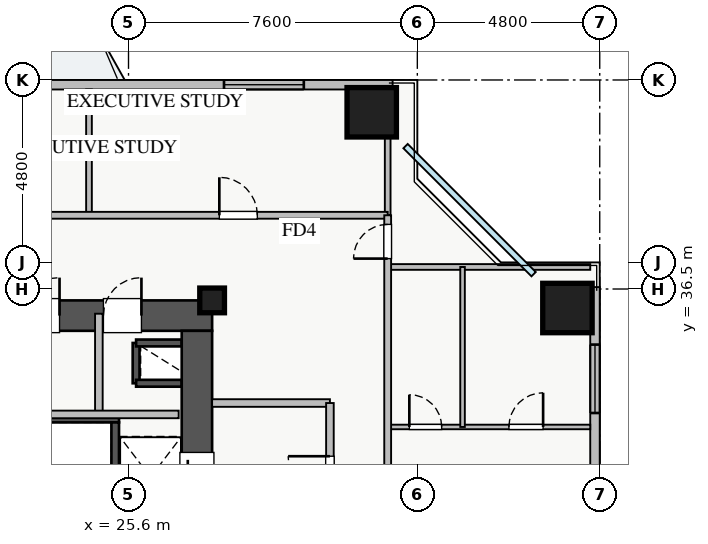
"""IFC4 building model, lengths in metres.
Left out: names, types, materials, properties, quantities, classifications, styles, units other than length and angle.
Written with IfcOpenShell. Run it as: python <this file> out.ifc"""

import sys

from ifc_helpers import new_model, si_unit, direction, frame, frame_2d, origin, origin_2d, place, context, subcontext, project, spatial, rectangle, extrude, source, transform, mapped, element, fill, save


model = new_model("IFC4")
c1 = context("Model", 3, precision=1e-05, world=origin(), true_north=direction((0.0, 1.0)))
c2 = subcontext(c1, "Body", "Model", "MODEL_VIEW")
j1 = project(units=[si_unit("LENGTHUNIT", "METRE"), si_unit("PLANEANGLEUNIT", "RADIAN")], contexts=[c1])
p1 = place(None, origin())
s1 = spatial("IfcSite", under=j1, at=p1, CompositionType="ELEMENT")
p2 = place(p1, origin())
s2 = spatial("IfcBuilding", under=s1, at=p2, CompositionType="ELEMENT")
p3 = place(p2, frame((0.0, 0.0, 36.0)))
s3 = spatial("IfcBuildingStorey", under=s2, at=p3, CompositionType="ELEMENT", Elevation=36.0)
p4 = place(p3, frame((25.8, 34.02, 0.0), z_axis=(0.0, 0.0, 1.0), x_axis=(0.0, 1.0, 0.0)))
e1 = element("IfcWall", 1, at=p4, inside=s3, PredefinedType="SHEAR", context=c2, shape_type="SweptSolid", body=[
    extrude(rectangle(XDim=1.06, YDim=0.18, at=frame_2d((0.53, 0.0))), origin(), (0.0, 0.0, 1.0), 3.07),
])
for number, where, z_axis, x_axis in (
    (2, (25.8, 35.08, 0.0), (0.0, 0.0, 1.0), (1.0, 0.0, 0.0)),
    (3, (25.8, 34.02, 0.0), (0.0, 0.0, 1.0), (1.0, 0.0, 0.0)),
):
    element("IfcWall", number, at=place(p3, frame(where, z_axis=z_axis, x_axis=x_axis)), inside=s3, PredefinedType="SHEAR", context=c2, shape_type="SweptSolid", body=[
        extrude(rectangle(XDim=1.2, YDim=0.18, at=frame_2d((0.6, 0.0))), origin(), (0.0, 0.0, 1.0), 3.07),
    ])
p5 = place(p3, frame((18.2, 33.09, 0.0), z_axis=(0.0, 0.0, 1.0), x_axis=(1.0, 0.0, 0.0)))
e4 = element("IfcWall", 4, at=p5, inside=s3, PredefinedType="SHEAR", context=c2, shape_type="SweptSolid", body=[
    extrude(rectangle(XDim=7.15, YDim=0.2, at=frame_2d((3.575, 0.0))), origin(), (0.0, 0.0, 1.0), 3.25),
])
p6 = place(p5, frame((0.35, 0.0, 0.0)))
e5 = element("IfcOpeningElement", 5, at=p6, cuts=e4, PredefinedType="OPENING", context=c2, shape_type="SweptSolid", body=[
    extrude(rectangle(XDim=1.1, YDim=2.05, at=frame_2d((0.55, 1.025))), frame((0.0, 0.11, 0.0), z_axis=(0.0, -1.0, 0.0), x_axis=(1.0, 0.0, 0.0)), (0.0, 0.0, 1.0), 0.22),
])
p7 = place(p3, frame((25.25, 30.05, 0.0), z_axis=(0.0, 0.0, 1.0), x_axis=(0.0, 1.0, 0.0)))
e6 = element("IfcWall", 6, at=p7, inside=s3, PredefinedType="SHEAR", context=c2, shape_type="SweptSolid", body=[
    extrude(rectangle(XDim=2.94, YDim=0.2, at=frame_2d((1.47, 0.0))), origin(), (0.0, 0.0, 1.0), 3.25),
])
p8 = place(p3, frame((10.2, 35.8, 0.0), z_axis=(0.0, 0.0, 1.0), x_axis=(1.0, 0.0, 0.0)))
e7 = element("IfcWall", 7, at=p8, inside=s3, PredefinedType="SHEAR", context=c2, shape_type="SweptSolid", body=[
    extrude(rectangle(XDim=17.6, YDim=0.8, at=frame_2d((8.8, 0.0))), origin(), (0.0, 0.0, 1.0), 3.25),
])
p9 = place(p8, frame((1.15, 0.0, 0.0)))
e8 = element("IfcOpeningElement", 8, at=p9, cuts=e7, PredefinedType="OPENING", context=c2, shape_type="SweptSolid", body=[
    extrude(rectangle(XDim=1.1, YDim=2.05, at=frame_2d((0.55, 1.025))), frame((0.0, 0.41, 0.0), z_axis=(0.0, -1.0, 0.0), x_axis=(1.0, 0.0, 0.0)), (0.0, 0.0, 1.0), 0.82),
])
p10 = place(p8, frame((8.3, 0.0, 0.0)))
e9 = element("IfcOpeningElement", 9, at=p10, cuts=e7, PredefinedType="OPENING", context=c2, shape_type="SweptSolid", body=[
    extrude(rectangle(XDim=1.1, YDim=2.05, at=frame_2d((0.55, 1.025))), frame((0.0, 0.41, 0.0), z_axis=(0.0, -1.0, 0.0), x_axis=(1.0, 0.0, 0.0)), (0.0, 0.0, 1.0), 0.82),
])
p11 = place(p8, frame((10.05, 0.0, 0.0)))
e10 = element("IfcOpeningElement", 10, at=p11, cuts=e7, PredefinedType="OPENING", context=c2, shape_type="SweptSolid", body=[
    extrude(rectangle(XDim=1.1, YDim=2.05, at=frame_2d((0.55, 1.025))), frame((0.0, 0.41, 0.0), z_axis=(0.0, -1.0, 0.0), x_axis=(1.0, 0.0, 0.0)), (0.0, 0.0, 1.0), 0.82),
])
p12 = place(p8, frame((14.74, 0.0, 0.0)))
e11 = element("IfcOpeningElement", 11, at=p12, cuts=e7, PredefinedType="OPENING", context=c2, shape_type="SweptSolid", body=[
    extrude(rectangle(XDim=1.0, YDim=2.05, at=frame_2d((0.5, 1.025))), frame((0.0, 0.41, 0.0), z_axis=(0.0, -1.0, 0.0), x_axis=(1.0, 0.0, 0.0)), (0.0, 0.0, 1.0), 0.82),
])
p13 = place(p8, frame((12.585, 0.0, 0.0)))
e12 = element("IfcOpeningElement", 12, at=p13, cuts=e7, PredefinedType="OPENING", context=c2, shape_type="SweptSolid", body=[
    extrude(rectangle(XDim=1.0, YDim=2.05, at=frame_2d((0.5, 1.025))), frame((0.0, 0.41, 0.0), z_axis=(0.0, -1.0, 0.0), x_axis=(1.0, 0.0, 0.0)), (0.0, 0.0, 1.0), 0.82),
])
p14 = place(p3, frame((27.4, 29.8, 0.0), z_axis=(0.0, 0.0, 1.0), x_axis=(0.0, 1.0, 0.0)))
e13 = element("IfcWall", 13, at=p14, inside=s3, PredefinedType="SHEAR", context=c2, shape_type="SweptSolid", body=[
    extrude(rectangle(XDim=5.6, YDim=0.8, at=frame_2d((2.8, 0.0))), origin(), (0.0, 0.0, 1.0), 3.25),
])
p15 = place(p14, frame((1.1, 0.0, 0.0)))
e14 = element("IfcOpeningElement", 14, at=p15, cuts=e13, PredefinedType="OPENING", context=c2, shape_type="SweptSolid", body=[
    extrude(rectangle(XDim=1.3, YDim=2.05, at=frame_2d((0.65, 1.025))), frame((0.0, 0.41, 0.0), z_axis=(0.0, -1.0, 0.0), x_axis=(1.0, 0.0, 0.0)), (0.0, 0.0, 1.0), 0.82),
])
m1 = source(origin(), c2, "Body", "SweptSolid", [
    extrude(rectangle(XDim=0.65, YDim=0.65, at=origin_2d()), origin(), (0.0, 0.0, 1.0), 3.25),
])
p16 = place(p3, frame((27.8, 36.2, 0.0), z_axis=(0.0, 0.0, 1.0), x_axis=(1.0, 0.0, 0.0)))
e15 = element("IfcColumn", 15, at=p16, inside=s3, PredefinedType="PILASTER", context=c2, shape_type="MappedRepresentation", body=[
    mapped(m1, transform((0.0, 0.0, 0.0), x_axis=(1.0, 0.0, 0.0), y_axis=(0.0, 1.0, 0.0), z_axis=(0.0, 0.0, 1.0), scale=1.0)),
])
m2 = source(origin(), c2, "Body", "SweptSolid", [
    extrude(rectangle(XDim=1.3, YDim=1.3, at=origin_2d()), origin(), (0.0, 0.0, 1.0), 3.25),
])
for number, where, z_axis, x_axis in (
    (16, (37.15, 36.0, 0.0), (0.0, 0.0, 1.0), (1.0, 0.0, 0.0)),
    (17, (32.0, 41.15, 0.0), (0.0, 0.0, 1.0), (1.0, 0.0, 0.0)),
):
    element("IfcColumn", number, at=place(p3, frame(where, z_axis=z_axis, x_axis=x_axis)), inside=s3, PredefinedType="COLUMN", context=c2, shape_type="MappedRepresentation", body=[
        mapped(m2, transform((0.0, 0.0, 0.0), x_axis=(1.0, 0.0, 0.0), y_axis=(0.0, 1.0, 0.0), z_axis=(0.0, 0.0, 1.0), scale=1.0)),
    ])
p17 = place(p3, frame((5.45, 41.875, 0.0), z_axis=(0.0, 0.0, 1.0), x_axis=(1.0, 0.0, 0.0)))
e18 = element("IfcWall", 18, at=p17, inside=s3, PredefinedType="STANDARD", context=c2, shape_type="SweptSolid", body=[
    extrude(rectangle(XDim=27.1, YDim=0.25, at=frame_2d((13.55, 0.0))), origin(), (0.0, 0.0, 1.0), 2.61),
])
p18 = place(p17, frame((14.4, 0.0, 0.0)))
e19 = element("IfcOpeningElement", 19, at=p18, cuts=e18, PredefinedType="OPENING", context=c2, shape_type="SweptSolid", body=[
    extrude(rectangle(XDim=1.2, YDim=2.1, at=frame_2d((0.6, 1.05))), frame((0.0, 0.135, 0.0), z_axis=(0.0, -1.0, 0.0), x_axis=(1.0, 0.0, 0.0)), (0.0, 0.0, 1.0), 0.27),
])
p19 = place(p17, frame((1.365, 0.0, 0.9)))
e20 = element("IfcOpeningElement", 20, at=p19, cuts=e18, PredefinedType="OPENING", context=c2, shape_type="SweptSolid", body=[
    extrude(rectangle(XDim=1.8, YDim=1.5, at=frame_2d((0.9, 0.75))), frame((0.0, 0.135, 0.0), z_axis=(0.0, -1.0, 0.0), x_axis=(1.0, 0.0, 0.0)), (0.0, 0.0, 1.0), 0.27),
])
p20 = place(p17, frame((9.263, 0.0, 0.9)))
e21 = element("IfcOpeningElement", 21, at=p20, cuts=e18, PredefinedType="OPENING", context=c2, shape_type="SweptSolid", body=[
    extrude(rectangle(XDim=1.8, YDim=1.45, at=frame_2d((0.9, 0.725))), frame((0.0, 0.135, 0.0), z_axis=(0.0, -1.0, 0.0), x_axis=(1.0, 0.0, 0.0)), (0.0, 0.0, 1.0), 0.27),
])
p21 = place(p17, frame((16.188, 0.0, 0.9)))
e22 = element("IfcOpeningElement", 22, at=p21, cuts=e18, PredefinedType="OPENING", context=c2, shape_type="SweptSolid", body=[
    extrude(rectangle(XDim=1.5, YDim=1.45, at=frame_2d((0.75, 0.725))), frame((0.0, 0.135, 0.0), z_axis=(0.0, -1.0, 0.0), x_axis=(1.0, 0.0, 0.0)), (0.0, 0.0, 1.0), 0.27),
])
p22 = place(p17, frame((22.663, 0.0, 0.9)))
e23 = element("IfcOpeningElement", 23, at=p22, cuts=e18, PredefinedType="OPENING", context=c2, shape_type="SweptSolid", body=[
    extrude(rectangle(XDim=2.1, YDim=1.48, at=frame_2d((1.05, 0.74))), frame((0.0, 0.135, 0.0), z_axis=(0.0, -1.0, 0.0), x_axis=(1.0, 0.0, 0.0)), (0.0, 0.0, 1.0), 0.27),
])
p23 = place(p17, frame((5.149, 0.0, 0.9)))
e24 = element("IfcOpeningElement", 24, at=p23, cuts=e18, PredefinedType="OPENING", context=c2, shape_type="SweptSolid", body=[
    extrude(rectangle(XDim=2.4, YDim=1.5, at=frame_2d((1.2, 0.75))), frame((0.0, 0.135, 0.0), z_axis=(0.0, -1.0, 0.0), x_axis=(1.0, 0.0, 0.0)), (0.0, 0.0, 1.0), 0.27),
])
p24 = place(p3, frame((37.875, 9.45, 0.0), z_axis=(0.0, 0.0, 1.0), x_axis=(0.0, 1.0, 0.0)))
e25 = element("IfcWall", 25, at=p24, inside=s3, PredefinedType="STANDARD", context=c2, shape_type="SweptSolid", body=[
    extrude(rectangle(XDim=27.1, YDim=0.25, at=frame_2d((13.55, 0.0))), origin(), (0.0, 0.0, 1.0), 2.61),
])
p25 = place(p24, frame((14.4, 0.0, 0.0)))
e26 = element("IfcOpeningElement", 26, at=p25, cuts=e25, PredefinedType="OPENING", context=c2, shape_type="SweptSolid", body=[
    extrude(rectangle(XDim=1.2, YDim=2.1, at=frame_2d((0.6, 1.05))), frame((0.0, 0.135, 0.0), z_axis=(0.0, -1.0, 0.0), x_axis=(1.0, 0.0, 0.0)), (0.0, 0.0, 1.0), 0.27),
])
p26 = place(p24, frame((1.552, 0.0, 0.9)))
e27 = element("IfcOpeningElement", 27, at=p26, cuts=e25, PredefinedType="OPENING", context=c2, shape_type="SweptSolid", body=[
    extrude(rectangle(XDim=2.4, YDim=1.5, at=frame_2d((1.2, 0.75))), frame((0.0, 0.135, 0.0), z_axis=(0.0, -1.0, 0.0), x_axis=(1.0, 0.0, 0.0)), (0.0, 0.0, 1.0), 0.27),
])
p27 = place(p24, frame((23.788, 0.0, 0.9)))
e28 = element("IfcOpeningElement", 28, at=p27, cuts=e25, PredefinedType="OPENING", context=c2, shape_type="SweptSolid", body=[
    extrude(rectangle(XDim=1.8, YDim=1.5, at=frame_2d((0.9, 0.75))), frame((0.0, 0.135, 0.0), z_axis=(0.0, -1.0, 0.0), x_axis=(1.0, 0.0, 0.0)), (0.0, 0.0, 1.0), 0.27),
])
p28 = place(p24, frame((19.758, 0.0, 0.9)))
e29 = element("IfcOpeningElement", 29, at=p28, cuts=e25, PredefinedType="OPENING", context=c2, shape_type="SweptSolid", body=[
    extrude(rectangle(XDim=2.4, YDim=1.5, at=frame_2d((1.2, 0.75))), frame((0.0, 0.135, 0.0), z_axis=(0.0, -1.0, 0.0), x_axis=(1.0, 0.0, 0.0)), (0.0, 0.0, 1.0), 0.27),
])
p29 = place(p24, frame((8.755, 0.0, 0.9)))
e30 = element("IfcOpeningElement", 30, at=p29, cuts=e25, PredefinedType="OPENING", context=c2, shape_type="SweptSolid", body=[
    extrude(rectangle(XDim=0.9, YDim=1.2, at=frame_2d((0.45, 0.6))), frame((0.0, 0.135, 0.0), z_axis=(0.0, -1.0, 0.0), x_axis=(1.0, 0.0, 0.0)), (0.0, 0.0, 1.0), 0.27),
])
p30 = place(p3, frame((27.8, 33.5, 0.0), z_axis=(0.0, 0.0, 1.0), x_axis=(1.0, 0.0, 0.0)))
e31 = element("IfcWall", 31, at=p30, inside=s3, PredefinedType="PARTITIONING", context=c2, shape_type="SweptSolid", body=[
    extrude(rectangle(XDim=3.1, YDim=0.2, at=frame_2d((1.55, 0.0))), origin(), (0.0, 0.0, 1.0), 3.07),
])
p31 = place(p3, frame((30.9, 29.6, 0.0), z_axis=(0.0, 0.0, 1.0), x_axis=(0.0, 1.0, 0.0)))
e32 = element("IfcWall", 32, at=p31, inside=s3, PredefinedType="PARTITIONING", context=c2, shape_type="SweptSolid", body=[
    extrude(rectangle(XDim=3.9, YDim=0.2, at=frame_2d((1.95, 0.0))), origin(), (0.0, 0.0, 1.0), 3.07),
])
p32 = place(p31, frame((1.4, 0.0, 0.0)))
e33 = element("IfcOpeningElement", 33, at=p32, cuts=e32, PredefinedType="OPENING", context=c2, shape_type="SweptSolid", body=[
    extrude(rectangle(XDim=1.1, YDim=2.05, at=frame_2d((0.55, 1.025))), frame((0.0, 0.11, 0.0), z_axis=(0.0, -1.0, 0.0), x_axis=(1.0, 0.0, 0.0)), (0.0, 0.0, 1.0), 0.22),
])
p33 = place(p3, frame((24.82, 33.2, 0.0), z_axis=(0.0, 0.0, 1.0), x_axis=(0.0, 1.0, 0.0)))
e34 = element("IfcWall", 34, at=p33, inside=s3, PredefinedType="PARTITIONING", context=c2, shape_type="SweptSolid", body=[
    extrude(rectangle(XDim=2.65, YDim=0.2, at=frame_2d((1.325, 0.0))), origin(), (0.0, 0.0, 1.0), 3.07),
])
p34 = place(p3, frame((21.75, 33.2, 0.0), z_axis=(0.0, 0.0, 1.0), x_axis=(1.0, 0.0, 0.0)))
e35 = element("IfcWall", 35, at=p34, inside=s3, PredefinedType="PARTITIONING", context=c2, shape_type="SweptSolid", body=[
    extrude(rectangle(XDim=5.17, YDim=0.2, at=frame_2d((2.585, 0.0))), origin(), (0.0, 0.0, 1.0), 3.07),
])
for number, where, z_axis, x_axis in (
    (36, (24.56, 38.44, 0.0), (0.0, 0.0, 1.0), (0.0, 1.0, 0.0)),
    (37, (32.42, 38.44, 0.0), (0.0, 0.0, 1.0), (0.0, 1.0, 0.0)),
):
    element("IfcWall", number, at=place(p3, frame(where, z_axis=z_axis, x_axis=x_axis)), inside=s3, PredefinedType="PARTITIONING", context=c2, shape_type="SweptSolid", body=[
        extrude(rectangle(XDim=3.31, YDim=0.15, at=frame_2d((1.655, 0.0))), origin(), (0.0, 0.0, 1.0), 3.07),
    ])
p35 = place(p3, frame((8.85, 38.44, 0.0), z_axis=(0.0, 0.0, 1.0), x_axis=(1.0, 0.0, 0.0)))
e38 = element("IfcWall", 38, at=p35, inside=s3, PredefinedType="PARTITIONING", context=c2, shape_type="SweptSolid", body=[
    extrude(rectangle(XDim=23.57, YDim=0.18, at=frame_2d((11.785, 0.0))), origin(), (0.0, 0.0, 1.0), 3.07),
])
p36 = place(p35, frame((3.77, 0.0, 0.0)))
e39 = element("IfcOpeningElement", 39, at=p36, cuts=e38, PredefinedType="OPENING", context=c2, shape_type="SweptSolid", body=[
    extrude(rectangle(XDim=1.0, YDim=2.05, at=frame_2d((0.5, 1.025))), frame((0.0, 0.1, 0.0), z_axis=(0.0, -1.0, 0.0), x_axis=(1.0, 0.0, 0.0)), (0.0, 0.0, 1.0), 0.2),
])
p37 = place(p35, frame((11.625, 0.0, 0.0)))
e40 = element("IfcOpeningElement", 40, at=p37, cuts=e38, PredefinedType="OPENING", context=c2, shape_type="SweptSolid", body=[
    extrude(rectangle(XDim=1.0, YDim=2.05, at=frame_2d((0.5, 1.025))), frame((0.0, 0.1, 0.0), z_axis=(0.0, -1.0, 0.0), x_axis=(1.0, 0.0, 0.0)), (0.0, 0.0, 1.0), 0.2),
])
p38 = place(p35, frame((19.14, 0.0, 0.0)))
e41 = element("IfcOpeningElement", 41, at=p38, cuts=e38, PredefinedType="OPENING", context=c2, shape_type="SweptSolid", body=[
    extrude(rectangle(XDim=1.0, YDim=2.05, at=frame_2d((0.5, 1.025))), frame((0.0, 0.1, 0.0), z_axis=(0.0, -1.0, 0.0), x_axis=(1.0, 0.0, 0.0)), (0.0, 0.0, 1.0), 0.2),
])
p39 = place(p3, frame((32.42, 37.08, 0.0), z_axis=(0.0, 0.0, 1.0), x_axis=(1.0, 0.0, 0.0)))
e42 = element("IfcWall", 42, at=p39, inside=s3, PredefinedType="PARTITIONING", context=c2, shape_type="SweptSolid", body=[
    extrude(rectangle(XDim=5.33, YDim=0.15, at=frame_2d((2.665, 0.0))), origin(), (0.0, 0.0, 1.0), 3.07),
])
p40 = place(p3, frame((32.42, 32.87, 0.0), z_axis=(0.0, 0.0, 1.0), x_axis=(1.0, 0.0, 0.0)))
e43 = element("IfcWall", 43, at=p40, inside=s3, PredefinedType="PLUMBINGWALL", context=c2, shape_type="SweptSolid", body=[
    extrude(rectangle(XDim=5.33, YDim=0.12, at=frame_2d((2.665, 0.0))), origin(), (0.0, 0.0, 1.0), 3.07),
])
p41 = place(p40, frame((0.57, 0.0, 0.0)))
e44 = element("IfcOpeningElement", 44, at=p41, cuts=e43, PredefinedType="OPENING", context=c2, shape_type="SweptSolid", body=[
    extrude(rectangle(XDim=0.85, YDim=2.05, at=frame_2d((0.425, 1.025))), frame((0.0, 0.07, 0.0), z_axis=(0.0, -1.0, 0.0), x_axis=(1.0, 0.0, 0.0)), (0.0, 0.0, 1.0), 0.14),
])
p42 = place(p40, frame((3.19, 0.0, 0.0)))
e45 = element("IfcOpeningElement", 45, at=p42, cuts=e43, PredefinedType="OPENING", context=c2, shape_type="SweptSolid", body=[
    extrude(rectangle(XDim=0.9, YDim=2.05, at=frame_2d((0.45, 1.025))), frame((0.0, 0.07, 0.0), z_axis=(0.0, -1.0, 0.0), x_axis=(1.0, 0.0, 0.0)), (0.0, 0.0, 1.0), 0.14),
])
p43 = place(p3, frame((34.39, 32.87, 0.0), z_axis=(0.0, 0.0, 1.0), x_axis=(0.0, 1.0, 0.0)))
e46 = element("IfcWall", 46, at=p43, inside=s3, PredefinedType="PLUMBINGWALL", context=c2, shape_type="SweptSolid", body=[
    extrude(rectangle(XDim=4.21, YDim=0.12, at=frame_2d((2.105, 0.0))), origin(), (0.0, 0.0, 1.0), 3.07),
])
p44 = place(p3, frame((32.42, 7.21, 0.0), z_axis=(0.0, 0.0, 1.0), x_axis=(0.0, 1.0, 0.0)))
e47 = element("IfcWall", 47, at=p44, inside=s3, PredefinedType="PARTITIONING", context=c2, shape_type="SweptSolid", body=[
    extrude(rectangle(XDim=31.23, YDim=0.18, at=frame_2d((15.615, 0.0))), origin(), (0.0, 0.0, 1.0), 2.815),
])
p45 = place(p44, frame((30.09, 0.0, 0.0)))
e48 = element("IfcOpeningElement", 48, at=p45, cuts=e47, PredefinedType="OPENING", context=c2, shape_type="SweptSolid", body=[
    extrude(rectangle(XDim=0.9, YDim=2.05, at=frame_2d((0.45, 1.025))), frame((0.0, 0.1, 0.0), z_axis=(0.0, -1.0, 0.0), x_axis=(1.0, 0.0, 0.0)), (0.0, 0.0, 1.0), 0.2),
])
p46 = place(p44, frame((0.415, 0.0, 0.0)))
e49 = element("IfcOpeningElement", 49, at=p46, cuts=e47, PredefinedType="OPENING", context=c2, shape_type="SweptSolid", body=[
    extrude(rectangle(XDim=0.9, YDim=2.05, at=frame_2d((0.45, 1.025))), frame((0.0, 0.1, 0.0), z_axis=(0.0, -1.0, 0.0), x_axis=(1.0, 0.0, 0.0)), (0.0, 0.0, 1.0), 0.2),
])
p47 = place(p44, frame((3.465, 0.0, 0.0)))
e50 = element("IfcOpeningElement", 50, at=p47, cuts=e47, PredefinedType="OPENING", context=c2, shape_type="SweptSolid", body=[
    extrude(rectangle(XDim=1.0, YDim=2.05, at=frame_2d((0.5, 1.025))), frame((0.0, 0.1, 0.0), z_axis=(0.0, -1.0, 0.0), x_axis=(1.0, 0.0, 0.0)), (0.0, 0.0, 1.0), 0.2),
])
p48 = place(p44, frame((12.635, 0.0, 0.0)))
e51 = element("IfcOpeningElement", 51, at=p48, cuts=e47, PredefinedType="OPENING", context=c2, shape_type="SweptSolid", body=[
    extrude(rectangle(XDim=1.0, YDim=2.05, at=frame_2d((0.5, 1.025))), frame((0.0, 0.1, 0.0), z_axis=(0.0, -1.0, 0.0), x_axis=(1.0, 0.0, 0.0)), (0.0, 0.0, 1.0), 0.2),
])
p49 = place(p44, frame((22.5, 0.0, 0.0)))
e52 = element("IfcOpeningElement", 52, at=p49, cuts=e47, PredefinedType="OPENING", context=c2, shape_type="SweptSolid", body=[
    extrude(rectangle(XDim=1.0, YDim=2.05, at=frame_2d((0.5, 1.025))), frame((0.0, 0.1, 0.0), z_axis=(0.0, -1.0, 0.0), x_axis=(1.0, 0.0, 0.0)), (0.0, 0.0, 1.0), 0.2),
])
m3 = source(origin(), c2, "Body", "SweptSolid", [
    extrude(rectangle(XDim=2.1, YDim=1.48, at=frame_2d((1.05, 0.74))), frame((0.0, 0.03, 0.0), z_axis=(0.0, -1.0, 0.0), x_axis=(1.0, 0.0, 0.0)), (0.0, 0.0, 1.0), 0.06),
])
p50 = place(p22, origin())
e53 = element("IfcWindow", 53, at=p50, inside=s3, PartitioningType="TRIPLE_PANEL_VERTICAL", PredefinedType="WINDOW", context=c2, shape_type="MappedRepresentation", body=[
    mapped(m3, transform((0.0, 0.0, 0.0), x_axis=(1.0, 0.0, 0.0), y_axis=(0.0, 1.0, 0.0), z_axis=(0.0, 0.0, 1.0), scale=1.0)),
])
fill(e23, e53)
m4 = source(origin(), c2, "Body", "SweptSolid", [
    extrude(rectangle(XDim=1.8, YDim=1.5, at=frame_2d((0.9, 0.75))), frame((0.0, 0.03, 0.0), z_axis=(0.0, -1.0, 0.0), x_axis=(1.0, 0.0, 0.0)), (0.0, 0.0, 1.0), 0.06),
])
p51 = place(p27, origin())
e54 = element("IfcWindow", 54, at=p51, inside=s3, PartitioningType="TRIPLE_PANEL_VERTICAL", PredefinedType="WINDOW", context=c2, shape_type="MappedRepresentation", body=[
    mapped(m4, transform((0.0, 0.0, 0.0), x_axis=(1.0, 0.0, 0.0), y_axis=(0.0, 1.0, 0.0), z_axis=(0.0, 0.0, 1.0), scale=1.0)),
])
fill(e28, e54)
m5 = source(origin(), c2, "Body", "SweptSolid", [
    extrude(rectangle(XDim=1.3, YDim=2.05, at=frame_2d((0.65, 1.025))), frame((0.0, 0.025, 0.0), z_axis=(0.0, -1.0, 0.0), x_axis=(1.0, 0.0, 0.0)), (0.0, 0.0, 1.0), 0.05),
])
p52 = place(p15, origin())
e55 = element("IfcDoor", 55, at=p52, inside=s3, OperationType="SLIDING_TO_LEFT", PredefinedType="DOOR", context=c2, shape_type="MappedRepresentation", body=[
    mapped(m5, transform((0.0, 0.0, 0.0), x_axis=(1.0, 0.0, 0.0), y_axis=(0.0, 1.0, 0.0), z_axis=(0.0, 0.0, 1.0), scale=1.0)),
])
fill(e14, e55)
m6 = source(origin(), c2, "Body", "SweptSolid", [
    extrude(rectangle(XDim=1.0, YDim=2.05, at=frame_2d((0.5, 1.025))), frame((0.0, 0.025, 0.0), z_axis=(0.0, -1.0, 0.0), x_axis=(1.0, 0.0, 0.0)), (0.0, 0.0, 1.0), 0.05),
])
p53 = place(p12, origin())
e56 = element("IfcDoor", 56, at=p53, inside=s3, OperationType="SINGLE_SWING_RIGHT", PredefinedType="DOOR", context=c2, shape_type="MappedRepresentation", body=[
    mapped(m6, transform((0.0, 0.0, 0.0), x_axis=(1.0, 0.0, 0.0), y_axis=(0.0, 1.0, 0.0), z_axis=(0.0, 0.0, 1.0), scale=1.0)),
])
fill(e11, e56)
p54 = place(p13, origin())
e57 = element("IfcDoor", 57, at=p54, inside=s3, OperationType="SINGLE_SWING_RIGHT", PredefinedType="DOOR", context=c2, shape_type="MappedRepresentation", body=[
    mapped(m6, transform((0.0, 0.0, 0.0), x_axis=(1.0, 0.0, 0.0), y_axis=(0.0, 1.0, 0.0), z_axis=(0.0, 0.0, 1.0), scale=1.0)),
])
fill(e12, e57)
m7 = source(origin(), c2, "Body", "SweptSolid", [
    extrude(rectangle(XDim=1.1, YDim=2.05, at=frame_2d((0.55, 1.025))), frame((0.0, 0.025, 0.0), z_axis=(0.0, -1.0, 0.0), x_axis=(1.0, 0.0, 0.0)), (0.0, 0.0, 1.0), 0.05),
])
p55 = place(p32, origin())
e58 = element("IfcDoor", 58, at=p55, inside=s3, OperationType="SINGLE_SWING_RIGHT", PredefinedType="DOOR", context=c2, shape_type="MappedRepresentation", body=[
    mapped(m7, transform((0.0, 0.0, 0.0), x_axis=(1.0, 0.0, 0.0), y_axis=(0.0, 1.0, 0.0), z_axis=(0.0, 0.0, 1.0), scale=1.0)),
])
fill(e33, e58)
p56 = place(p38, origin())
e59 = element("IfcDoor", 59, at=p56, inside=s3, OperationType="SINGLE_SWING_LEFT", PredefinedType="DOOR", context=c2, shape_type="MappedRepresentation", body=[
    mapped(m6, transform((0.0, 0.0, 0.0), x_axis=(1.0, 0.0, 0.0), y_axis=(0.0, 1.0, 0.0), z_axis=(0.0, 0.0, 1.0), scale=1.0)),
])
fill(e41, e59)
m8 = source(origin(), c2, "Body", "SweptSolid", [
    extrude(rectangle(XDim=0.85, YDim=2.05, at=frame_2d((0.425, 1.025))), frame((0.0, 0.025, 0.0), z_axis=(0.0, -1.0, 0.0), x_axis=(1.0, 0.0, 0.0)), (0.0, 0.0, 1.0), 0.05),
])
p57 = place(p41, origin())
e60 = element("IfcDoor", 60, at=p57, inside=s3, OperationType="SINGLE_SWING_LEFT", PredefinedType="DOOR", context=c2, shape_type="MappedRepresentation", body=[
    mapped(m8, transform((0.0, 0.0, 0.0), x_axis=(1.0, 0.0, 0.0), y_axis=(0.0, 1.0, 0.0), z_axis=(0.0, 0.0, 1.0), scale=1.0)),
])
fill(e44, e60)
m9 = source(origin(), c2, "Body", "SweptSolid", [
    extrude(rectangle(XDim=0.9, YDim=2.05, at=frame_2d((0.45, 1.025))), frame((0.0, 0.025, 0.0), z_axis=(0.0, -1.0, 0.0), x_axis=(1.0, 0.0, 0.0)), (0.0, 0.0, 1.0), 0.05),
])
p58 = place(p42, origin())
e61 = element("IfcDoor", 61, at=p58, inside=s3, OperationType="SINGLE_SWING_RIGHT", PredefinedType="DOOR", context=c2, shape_type="MappedRepresentation", body=[
    mapped(m9, transform((0.0, 0.0, 0.0), x_axis=(1.0, 0.0, 0.0), y_axis=(0.0, 1.0, 0.0), z_axis=(0.0, 0.0, 1.0), scale=1.0)),
])
fill(e45, e61)
p59 = place(p45, origin())
e62 = element("IfcDoor", 62, at=p59, inside=s3, OperationType="SINGLE_SWING_LEFT", PredefinedType="DOOR", context=c2, shape_type="MappedRepresentation", body=[
    mapped(m9, transform((0.0, 0.0, 0.0), x_axis=(1.0, 0.0, 0.0), y_axis=(0.0, 1.0, 0.0), z_axis=(0.0, 0.0, 1.0), scale=1.0)),
])
fill(e48, e62)
save(model, sys.argv[1])
